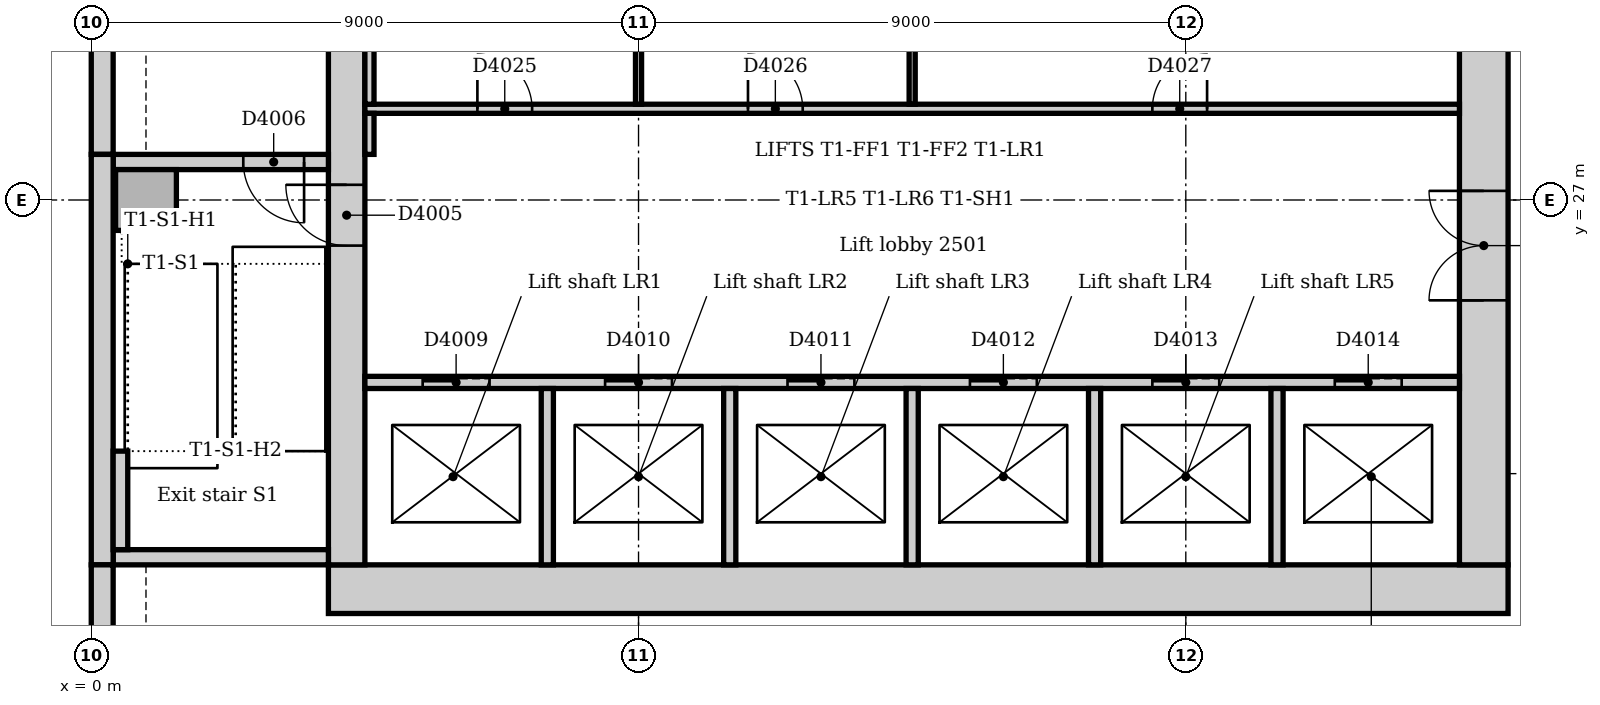
"""IFC4 building model, lengths in metres.
Left out: names, types, materials, properties, quantities, classifications, styles, units other than length and angle.
Written with IfcOpenShell. Run it as: python <this file> out.ifc"""

import sys

from ifc_helpers import new_model, si_unit, direction, frame, frame_2d, origin, origin_2d, place, context, subcontext, project, spatial, rectangle, extrude, element, fill, save


model = new_model("IFC4")
c1 = context("Model", 3, precision=1e-05, world=origin(), true_north=direction((0.0, 1.0)))
c2 = subcontext(c1, "Body", "Model", "MODEL_VIEW")
j1 = project(units=[si_unit("LENGTHUNIT", "METRE"), si_unit("PLANEANGLEUNIT", "RADIAN")], contexts=[c1])
p1 = place(None, origin())
s1 = spatial("IfcSite", under=j1, at=p1, CompositionType="ELEMENT")
p2 = place(p1, origin())
s2 = spatial("IfcBuilding", under=s1, at=p2, CompositionType="ELEMENT")
p3 = place(p2, frame((0.0, 0.0, 108.0)))
s3 = spatial("IfcBuildingStorey", under=s2, at=p3, CompositionType="ELEMENT", Elevation=108.0)
p4 = place(p3, frame((3.9, 20.6, 0.0), z_axis=(0.0, 0.0, 1.0), x_axis=(1.0, 0.0, 0.0)))
e1 = element("IfcWall", 1, at=p4, inside=s3, PredefinedType="SOLIDWALL", context=c2, shape_type="SweptSolid", body=[
    extrude(rectangle(XDim=19.4, YDim=0.8, at=frame_2d((9.7, 0.0))), origin(), (0.0, 0.0, 1.0), 4.0),
])
p5 = place(p3, frame((22.9, 21.0, 0.0), z_axis=(0.0, 0.0, 1.0), x_axis=(0.0, 1.0, 0.0)))
e2 = element("IfcWall", 2, at=p5, inside=s3, PredefinedType="SOLIDWALL", context=c2, shape_type="SweptSolid", body=[
    extrude(rectangle(XDim=10.5, YDim=0.8, at=frame_2d((5.25, 0.0))), origin(), (0.0, 0.0, 1.0), 4.0),
])
p6 = place(p5, frame((4.35, 0.0, 0.0)))
e3 = element("IfcOpeningElement", 3, at=p6, cuts=e2, PredefinedType="OPENING", context=c2, shape_type="SweptSolid", body=[
    extrude(rectangle(XDim=1.8, YDim=2.1, at=frame_2d((0.9, 1.05))), frame((0.0, 0.41, 0.0), z_axis=(0.0, -1.0, 0.0), x_axis=(1.0, 0.0, 0.0)), (0.0, 0.0, 1.0), 0.82),
])
p7 = place(p3, frame((4.2, 31.5, 0.0), z_axis=(0.0, 0.0, 1.0), x_axis=(0.0, -1.0, 0.0)))
e4 = element("IfcWall", 4, at=p7, inside=s3, PredefinedType="SOLIDWALL", context=c2, shape_type="SweptSolid", body=[
    extrude(rectangle(XDim=10.5, YDim=0.6, at=frame_2d((5.25, 0.0))), origin(), (0.0, 0.0, 1.0), 4.0),
])
p8 = place(p7, frame((4.25, 0.0, 0.0)))
e5 = element("IfcOpeningElement", 5, at=p8, cuts=e4, PredefinedType="OPENING", context=c2, shape_type="SweptSolid", body=[
    extrude(rectangle(XDim=1.0, YDim=2.1, at=frame_2d((0.5, 1.05))), frame((0.0, 0.31, 0.0), z_axis=(0.0, -1.0, 0.0), x_axis=(1.0, 0.0, 0.0)), (0.0, 0.0, 1.0), 0.62),
])
p9 = place(p3, frame((0.36, 21.125, 0.0), z_axis=(0.0, 0.0, 1.0), x_axis=(1.0, 0.0, 0.0)))
e6 = element("IfcWall", 6, at=p9, inside=s3, PredefinedType="SOLIDWALL", context=c2, shape_type="SweptSolid", body=[
    extrude(rectangle(XDim=3.54, YDim=0.25, at=frame_2d((1.77, 0.0))), origin(), (0.0, 0.0, 1.0), 4.0),
])
p10 = place(p3, frame((3.9, 27.625, 0.0), z_axis=(0.0, 0.0, 1.0), x_axis=(-1.0, 0.0, 0.0)))
e7 = element("IfcWall", 7, at=p10, inside=s3, PredefinedType="SOLIDWALL", context=c2, shape_type="SweptSolid", body=[
    extrude(rectangle(XDim=3.54, YDim=0.25, at=frame_2d((1.77, 0.0))), origin(), (0.0, 0.0, 1.0), 4.0),
])
p11 = place(p10, frame((0.4, 0.0, 0.0)))
e8 = element("IfcOpeningElement", 8, at=p11, cuts=e7, PredefinedType="OPENING", context=c2, shape_type="SweptSolid", body=[
    extrude(rectangle(XDim=1.0, YDim=2.1, at=frame_2d((0.5, 1.05))), frame((0.0, 0.135, 0.0), z_axis=(0.0, -1.0, 0.0), x_axis=(1.0, 0.0, 0.0)), (0.0, 0.0, 1.0), 0.27),
])
p12 = place(p3, frame((0.9, 27.0, 0.0), z_axis=(0.0, 0.0, 1.0), x_axis=(1.0, 0.0, 0.0)))
e9 = element("IfcColumn", 9, at=p12, inside=s3, PredefinedType="COLUMN", context=c2, shape_type="SweptSolid", body=[
    extrude(rectangle(XDim=1.0, YDim=1.0, at=origin_2d()), origin(), (0.0, 0.0, 1.0), 4.0),
])
p13 = place(p3, frame((0.18, 35.25, 0.0), z_axis=(0.0, 0.0, 1.0), x_axis=(0.0, -1.0, 0.0)))
e10 = element("IfcWall", 10, at=p13, inside=s3, PredefinedType="STANDARD", context=c2, shape_type="SweptSolid", body=[
    extrude(rectangle(XDim=7.5, YDim=0.36, at=frame_2d((3.75, 0.0))), origin(), (0.0, 0.0, 1.0), 3.85),
])
p14 = place(p3, frame((0.18, 27.75, 0.0), z_axis=(0.0, 0.0, 1.0), x_axis=(0.0, -1.0, 0.0)))
e11 = element("IfcWall", 11, at=p14, inside=s3, PredefinedType="STANDARD", context=c2, shape_type="SweptSolid", body=[
    extrude(rectangle(XDim=6.75, YDim=0.36, at=frame_2d((3.375, 0.0))), origin(), (0.0, 0.0, 1.0), 3.85),
])
p15 = place(p3, frame((0.18, 21.0, 0.0), z_axis=(0.0, 0.0, 1.0), x_axis=(0.0, -1.0, 0.0)))
e12 = element("IfcWall", 12, at=p15, inside=s3, PredefinedType="STANDARD", context=c2, shape_type="SweptSolid", body=[
    extrude(rectangle(XDim=12.257, YDim=0.36, at=frame_2d((6.129, 0.0))), origin(), (0.0, 0.0, 1.0), 3.85),
])
p16 = place(p15, frame((1.35, 0.0, 0.9)))
e13 = element("IfcOpeningElement", 13, at=p16, cuts=e12, PredefinedType="OPENING", context=c2, shape_type="SweptSolid", body=[
    extrude(rectangle(XDim=3.3, YDim=1.6, at=frame_2d((1.65, 0.8))), frame((0.0, 0.19, 0.0), z_axis=(0.0, -1.0, 0.0), x_axis=(1.0, 0.0, 0.0)), (0.0, 0.0, 1.0), 0.38),
])
p17 = place(p15, frame((5.85, 0.0, 0.9)))
e14 = element("IfcOpeningElement", 14, at=p17, cuts=e12, PredefinedType="OPENING", context=c2, shape_type="SweptSolid", body=[
    extrude(rectangle(XDim=3.3, YDim=1.6, at=frame_2d((1.65, 0.8))), frame((0.0, 0.19, 0.0), z_axis=(0.0, -1.0, 0.0), x_axis=(1.0, 0.0, 0.0)), (0.0, 0.0, 1.0), 0.38),
])
p18 = place(p3, frame((0.48, 21.25, 0.0), z_axis=(0.0, 0.0, 1.0), x_axis=(0.0, 1.0, 0.0)))
e15 = element("IfcWall", 15, at=p18, inside=s3, PredefinedType="STANDARD", context=c2, shape_type="SweptSolid", body=[
    extrude(rectangle(XDim=1.62, YDim=0.24, at=frame_2d((0.81, 0.0))), origin(), (0.0, 0.0, 1.0), 4.0),
])
p19 = place(p3, frame((4.5, 24.0, 0.0), z_axis=(0.0, 0.0, 1.0), x_axis=(1.0, 0.0, 0.0)))
e16 = element("IfcWall", 16, at=p19, inside=s3, PredefinedType="PARTITIONING", context=c2, shape_type="SweptSolid", body=[
    extrude(rectangle(XDim=18.0, YDim=0.2, at=frame_2d((9.0, 0.0))), origin(), (0.0, 0.0, 1.0), 3.85),
])
p20 = place(p19, frame((0.95, 0.0, 0.0)))
e17 = element("IfcOpeningElement", 17, at=p20, cuts=e16, PredefinedType="OPENING", context=c2, shape_type="SweptSolid", body=[
    extrude(rectangle(XDim=1.1, YDim=2.1, at=frame_2d((0.55, 1.05))), frame((0.0, 0.11, 0.0), z_axis=(0.0, -1.0, 0.0), x_axis=(1.0, 0.0, 0.0)), (0.0, 0.0, 1.0), 0.22),
])
p21 = place(p19, frame((3.95, 0.0, 0.0)))
e18 = element("IfcOpeningElement", 18, at=p21, cuts=e16, PredefinedType="OPENING", context=c2, shape_type="SweptSolid", body=[
    extrude(rectangle(XDim=1.1, YDim=2.1, at=frame_2d((0.55, 1.05))), frame((0.0, 0.11, 0.0), z_axis=(0.0, -1.0, 0.0), x_axis=(1.0, 0.0, 0.0)), (0.0, 0.0, 1.0), 0.22),
])
p22 = place(p19, frame((6.95, 0.0, 0.0)))
e19 = element("IfcOpeningElement", 19, at=p22, cuts=e16, PredefinedType="OPENING", context=c2, shape_type="SweptSolid", body=[
    extrude(rectangle(XDim=1.1, YDim=2.1, at=frame_2d((0.55, 1.05))), frame((0.0, 0.11, 0.0), z_axis=(0.0, -1.0, 0.0), x_axis=(1.0, 0.0, 0.0)), (0.0, 0.0, 1.0), 0.22),
])
p23 = place(p19, frame((9.95, 0.0, 0.0)))
e20 = element("IfcOpeningElement", 20, at=p23, cuts=e16, PredefinedType="OPENING", context=c2, shape_type="SweptSolid", body=[
    extrude(rectangle(XDim=1.1, YDim=2.1, at=frame_2d((0.55, 1.05))), frame((0.0, 0.11, 0.0), z_axis=(0.0, -1.0, 0.0), x_axis=(1.0, 0.0, 0.0)), (0.0, 0.0, 1.0), 0.22),
])
p24 = place(p19, frame((12.95, 0.0, 0.0)))
e21 = element("IfcOpeningElement", 21, at=p24, cuts=e16, PredefinedType="OPENING", context=c2, shape_type="SweptSolid", body=[
    extrude(rectangle(XDim=1.1, YDim=2.1, at=frame_2d((0.55, 1.05))), frame((0.0, 0.11, 0.0), z_axis=(0.0, -1.0, 0.0), x_axis=(1.0, 0.0, 0.0)), (0.0, 0.0, 1.0), 0.22),
])
p25 = place(p19, frame((15.95, 0.0, 0.0)))
e22 = element("IfcOpeningElement", 22, at=p25, cuts=e16, PredefinedType="OPENING", context=c2, shape_type="SweptSolid", body=[
    extrude(rectangle(XDim=1.1, YDim=2.1, at=frame_2d((0.55, 1.05))), frame((0.0, 0.11, 0.0), z_axis=(0.0, -1.0, 0.0), x_axis=(1.0, 0.0, 0.0)), (0.0, 0.0, 1.0), 0.22),
])
for number, where, z_axis, x_axis in (
    (23, (7.5, 21.0, 0.0), (0.0, 0.0, 1.0), (0.0, 1.0, 0.0)),
    (24, (10.5, 21.0, 0.0), (0.0, 0.0, 1.0), (0.0, 1.0, 0.0)),
    (25, (13.5, 21.0, 0.0), (0.0, 0.0, 1.0), (0.0, 1.0, 0.0)),
    (26, (16.5, 21.0, 0.0), (0.0, 0.0, 1.0), (0.0, 1.0, 0.0)),
    (27, (19.5, 21.0, 0.0), (0.0, 0.0, 1.0), (0.0, 1.0, 0.0)),
):
    element("IfcWall", number, at=place(p3, frame(where, z_axis=z_axis, x_axis=x_axis)), inside=s3, PredefinedType="PARTITIONING", context=c2, shape_type="SweptSolid", body=[
        extrude(rectangle(XDim=2.9, YDim=0.2, at=frame_2d((1.45, 0.0))), origin(), (0.0, 0.0, 1.0), 3.85),
    ])
p26 = place(p3, frame((4.5, 28.5, 0.0), z_axis=(0.0, 0.0, 1.0), x_axis=(1.0, 0.0, 0.0)))
e28 = element("IfcWall", 28, at=p26, inside=s3, PredefinedType="PARTITIONING", context=c2, shape_type="SweptSolid", body=[
    extrude(rectangle(XDim=18.0, YDim=0.15, at=frame_2d((9.0, 0.0))), origin(), (0.0, 0.0, 1.0), 3.85),
])
p27 = place(p26, frame((1.85, 0.0, 0.0)))
e29 = element("IfcOpeningElement", 29, at=p27, cuts=e28, PredefinedType="OPENING", context=c2, shape_type="SweptSolid", body=[
    extrude(rectangle(XDim=0.9, YDim=2.1, at=frame_2d((0.45, 1.05))), frame((0.0, 0.085, 0.0), z_axis=(0.0, -1.0, 0.0), x_axis=(1.0, 0.0, 0.0)), (0.0, 0.0, 1.0), 0.17),
])
p28 = place(p26, frame((6.3, 0.0, 0.0)))
e30 = element("IfcOpeningElement", 30, at=p28, cuts=e28, PredefinedType="OPENING", context=c2, shape_type="SweptSolid", body=[
    extrude(rectangle(XDim=0.9, YDim=2.1, at=frame_2d((0.45, 1.05))), frame((0.0, 0.085, 0.0), z_axis=(0.0, -1.0, 0.0), x_axis=(1.0, 0.0, 0.0)), (0.0, 0.0, 1.0), 0.17),
])
p29 = place(p26, frame((12.95, 0.0, 0.0)))
e31 = element("IfcOpeningElement", 31, at=p29, cuts=e28, PredefinedType="OPENING", context=c2, shape_type="SweptSolid", body=[
    extrude(rectangle(XDim=0.9, YDim=2.1, at=frame_2d((0.45, 1.05))), frame((0.0, 0.085, 0.0), z_axis=(0.0, -1.0, 0.0), x_axis=(1.0, 0.0, 0.0)), (0.0, 0.0, 1.0), 0.17),
])
p30 = place(p3, frame((4.575, 27.75, 0.0), z_axis=(0.0, 0.0, 1.0), x_axis=(0.0, 1.0, 0.0)))
e32 = element("IfcWall", 32, at=p30, inside=s3, PredefinedType="PARTITIONING", context=c2, shape_type="SweptSolid", body=[
    extrude(rectangle(XDim=0.675, YDim=0.15, at=frame_2d((0.338, 0.0))), origin(), (0.0, 0.0, 1.0), 3.85),
])
p31 = place(p3, frame((4.575, 28.575, 0.0), z_axis=(0.0, 0.0, 1.0), x_axis=(0.0, 1.0, 0.0)))
e33 = element("IfcWall", 33, at=p31, inside=s3, PredefinedType="PARTITIONING", context=c2, shape_type="SweptSolid", body=[
    extrude(rectangle(XDim=2.675, YDim=0.15, at=frame_2d((1.337, 0.0))), origin(), (0.0, 0.0, 1.0), 3.85),
])
for number, where, z_axis, x_axis in (
    (34, (9.0, 28.575, 0.0), (0.0, 0.0, 1.0), (0.0, 1.0, 0.0)),
    (35, (13.5, 28.575, 0.0), (0.0, 0.0, 1.0), (0.0, 1.0, 0.0)),
):
    element("IfcWall", number, at=place(p3, frame(where, z_axis=z_axis, x_axis=x_axis)), inside=s3, PredefinedType="PARTITIONING", context=c2, shape_type="SweptSolid", body=[
        extrude(rectangle(XDim=2.675, YDim=0.1, at=frame_2d((1.337, 0.0))), origin(), (0.0, 0.0, 1.0), 3.85),
    ])
p32 = place(p8, frame((1.0, 0.0, 0.0), z_axis=(0.0, 0.0, 1.0), x_axis=(-1.0, 0.0, 0.0)))
e36 = element("IfcDoor", 36, at=p32, inside=s3, OperationType="SINGLE_SWING_RIGHT", PredefinedType="DOOR", context=c2, shape_type="SweptSolid", body=[
    extrude(rectangle(XDim=1.0, YDim=2.1, at=frame_2d((0.5, 1.05))), frame((0.0, 0.025, 0.0), z_axis=(0.0, -1.0, 0.0), x_axis=(1.0, 0.0, 0.0)), (0.0, 0.0, 1.0), 0.05),
])
fill(e5, e36)
p33 = place(p11, origin())
e37 = element("IfcDoor", 37, at=p33, inside=s3, OperationType="SINGLE_SWING_LEFT", PredefinedType="DOOR", context=c2, shape_type="SweptSolid", body=[
    extrude(rectangle(XDim=1.0, YDim=2.1, at=frame_2d((0.5, 1.05))), frame((0.0, 0.025, 0.0), z_axis=(0.0, -1.0, 0.0), x_axis=(1.0, 0.0, 0.0)), (0.0, 0.0, 1.0), 0.05),
])
fill(e8, e37)
p34 = place(p20, origin())
e38 = element("IfcDoor", 38, at=p34, inside=s3, OperationType="SLIDING_TO_LEFT", PredefinedType="DOOR", context=c2, shape_type="SweptSolid", body=[
    extrude(rectangle(XDim=1.1, YDim=2.1, at=frame_2d((0.55, 1.05))), frame((0.0, 0.025, 0.0), z_axis=(0.0, -1.0, 0.0), x_axis=(1.0, 0.0, 0.0)), (0.0, 0.0, 1.0), 0.05),
])
fill(e17, e38)
p35 = place(p21, origin())
e39 = element("IfcDoor", 39, at=p35, inside=s3, OperationType="SLIDING_TO_LEFT", PredefinedType="DOOR", context=c2, shape_type="SweptSolid", body=[
    extrude(rectangle(XDim=1.1, YDim=2.1, at=frame_2d((0.55, 1.05))), frame((0.0, 0.025, 0.0), z_axis=(0.0, -1.0, 0.0), x_axis=(1.0, 0.0, 0.0)), (0.0, 0.0, 1.0), 0.05),
])
fill(e18, e39)
p36 = place(p22, origin())
e40 = element("IfcDoor", 40, at=p36, inside=s3, OperationType="SLIDING_TO_LEFT", PredefinedType="DOOR", context=c2, shape_type="SweptSolid", body=[
    extrude(rectangle(XDim=1.1, YDim=2.1, at=frame_2d((0.55, 1.05))), frame((0.0, 0.025, 0.0), z_axis=(0.0, -1.0, 0.0), x_axis=(1.0, 0.0, 0.0)), (0.0, 0.0, 1.0), 0.05),
])
fill(e19, e40)
p37 = place(p23, origin())
e41 = element("IfcDoor", 41, at=p37, inside=s3, OperationType="SLIDING_TO_LEFT", PredefinedType="DOOR", context=c2, shape_type="SweptSolid", body=[
    extrude(rectangle(XDim=1.1, YDim=2.1, at=frame_2d((0.55, 1.05))), frame((0.0, 0.025, 0.0), z_axis=(0.0, -1.0, 0.0), x_axis=(1.0, 0.0, 0.0)), (0.0, 0.0, 1.0), 0.05),
])
fill(e20, e41)
p38 = place(p24, origin())
e42 = element("IfcDoor", 42, at=p38, inside=s3, OperationType="SLIDING_TO_LEFT", PredefinedType="DOOR", context=c2, shape_type="SweptSolid", body=[
    extrude(rectangle(XDim=1.1, YDim=2.1, at=frame_2d((0.55, 1.05))), frame((0.0, 0.025, 0.0), z_axis=(0.0, -1.0, 0.0), x_axis=(1.0, 0.0, 0.0)), (0.0, 0.0, 1.0), 0.05),
])
fill(e21, e42)
p39 = place(p25, origin())
e43 = element("IfcDoor", 43, at=p39, inside=s3, OperationType="SLIDING_TO_LEFT", PredefinedType="DOOR", context=c2, shape_type="SweptSolid", body=[
    extrude(rectangle(XDim=1.1, YDim=2.1, at=frame_2d((0.55, 1.05))), frame((0.0, 0.025, 0.0), z_axis=(0.0, -1.0, 0.0), x_axis=(1.0, 0.0, 0.0)), (0.0, 0.0, 1.0), 0.05),
])
fill(e22, e43)
p40 = place(p6, origin())
e44 = element("IfcDoor", 44, at=p40, inside=s3, OperationType="DOUBLE_DOOR_DOUBLE_SWING", PredefinedType="DOOR", context=c2, shape_type="SweptSolid", body=[
    extrude(rectangle(XDim=1.8, YDim=2.1, at=frame_2d((0.9, 1.05))), frame((0.0, 0.025, 0.0), z_axis=(0.0, -1.0, 0.0), x_axis=(1.0, 0.0, 0.0)), (0.0, 0.0, 1.0), 0.05),
])
fill(e3, e44)
p41 = place(p27, origin())
e45 = element("IfcDoor", 45, at=p41, inside=s3, OperationType="SINGLE_SWING_LEFT", PredefinedType="DOOR", context=c2, shape_type="SweptSolid", body=[
    extrude(rectangle(XDim=0.9, YDim=2.1, at=frame_2d((0.45, 1.05))), frame((0.0, 0.025, 0.0), z_axis=(0.0, -1.0, 0.0), x_axis=(1.0, 0.0, 0.0)), (0.0, 0.0, 1.0), 0.05),
])
fill(e29, e45)
p42 = place(p28, origin())
e46 = element("IfcDoor", 46, at=p42, inside=s3, OperationType="SINGLE_SWING_LEFT", PredefinedType="DOOR", context=c2, shape_type="SweptSolid", body=[
    extrude(rectangle(XDim=0.9, YDim=2.1, at=frame_2d((0.45, 1.05))), frame((0.0, 0.025, 0.0), z_axis=(0.0, -1.0, 0.0), x_axis=(1.0, 0.0, 0.0)), (0.0, 0.0, 1.0), 0.05),
])
fill(e30, e46)
p43 = place(p29, origin())
e47 = element("IfcDoor", 47, at=p43, inside=s3, OperationType="SINGLE_SWING_RIGHT", PredefinedType="DOOR", context=c2, shape_type="SweptSolid", body=[
    extrude(rectangle(XDim=0.9, YDim=2.1, at=frame_2d((0.45, 1.05))), frame((0.0, 0.025, 0.0), z_axis=(0.0, -1.0, 0.0), x_axis=(1.0, 0.0, 0.0)), (0.0, 0.0, 1.0), 0.05),
])
fill(e31, e47)
save(model, sys.argv[1])
